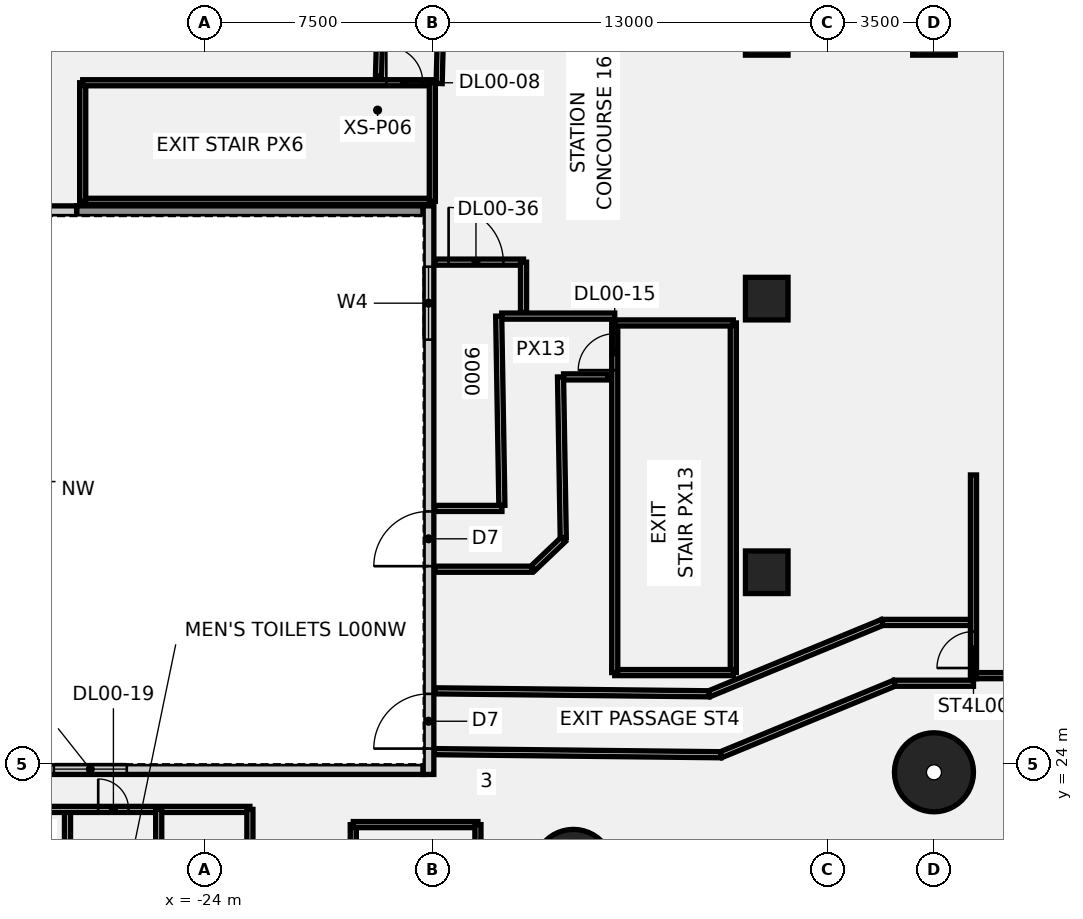
"""IFC4 building model, lengths in metres.
Left out: names, types, materials, properties, quantities, classifications, styles, units other than length and angle.
Written with IfcOpenShell. Run it as: python <this file> out.ifc"""

import sys

from ifc_helpers import new_model, si_unit, direction, frame, frame_2d, origin, origin_2d, place, context, subcontext, project, spatial, polyline, rectangle, circle, outline, extrude, element, fill, save


model = new_model("IFC4")
c1 = context("Model", 3, precision=1e-05, world=origin(), true_north=direction((0.0, 1.0)))
c2 = subcontext(c1, "Body", "Model", "MODEL_VIEW")
j1 = project(units=[si_unit("LENGTHUNIT", "METRE"), si_unit("PLANEANGLEUNIT", "RADIAN")], contexts=[c1])
p1 = place(None, origin())
s1 = spatial("IfcSite", under=j1, at=p1, CompositionType="ELEMENT")
p2 = place(p1, origin())
s2 = spatial("IfcBuilding", under=s1, at=p2, CompositionType="ELEMENT")
p3 = place(p2, origin())
s3 = spatial("IfcBuildingStorey", under=s2, at=p3, CompositionType="ELEMENT", Elevation=0.0)
for number, where, z_axis, x_axis in (
    (1, (0.0, 23.721, -0.55), (0.0, 0.0, 1.0), (1.0, 0.0, 0.0)),
    (2, (-11.86, 20.543, -0.55), (0.0, 0.0, 1.0), (1.0, 0.0, 0.0)),
):
    element("IfcColumn", number, at=place(p3, frame(where, z_axis=z_axis, x_axis=x_axis)), inside=s3, PredefinedType="COLUMN", context=c2, shape_type="SweptSolid", body=[
        extrude(circle(Radius=1.3, at=origin_2d()), origin(), (0.0, 0.0, 1.0), 9.05),
    ])
for number, where, z_axis, x_axis in (
    (3, (-5.5, 39.3, -0.55), (0.0, 0.0, 1.0), (1.0, 0.0, 0.0)),
    (4, (-5.5, 30.3, -0.55), (0.0, 0.0, 1.0), (1.0, 0.0, 0.0)),
    (5, (0.0, 48.008, -0.55), (0.0, 0.0, 1.0), (1.0, 0.0, 0.0)),
    (6, (-5.5, 48.008, -0.55), (0.0, 0.0, 1.0), (1.0, 0.0, 0.0)),
):
    element("IfcColumn", number, at=place(p3, frame(where, z_axis=z_axis, x_axis=x_axis)), inside=s3, PredefinedType="COLUMN", context=c2, shape_type="SweptSolid", body=[
        extrude(rectangle(XDim=1.4, YDim=1.4, at=origin_2d()), origin(), (0.0, 0.0, 1.0), 9.05),
    ])
p4 = place(p3, frame((-19.1, 10.3, 0.0), z_axis=(0.0, 0.0, 1.0), x_axis=(0.0, 1.0, 0.0)))
e7 = element("IfcWall", 7, at=p4, inside=s3, PredefinedType="PARTITIONING", context=c2, shape_type="SweptSolid", body=[
    extrude(rectangle(XDim=11.7, YDim=0.2, at=frame_2d((5.85, 0.0))), origin(), (0.0, 0.0, 1.0), 8.5),
])
p5 = place(p3, frame((-19.1, 22.0, 0.0), z_axis=(0.0, 0.0, 1.0), x_axis=(1.0, 0.0, 0.0)))
e8 = element("IfcWall", 8, at=p5, inside=s3, PredefinedType="PARTITIONING", context=c2, shape_type="SweptSolid", body=[
    extrude(rectangle(XDim=4.1, YDim=0.2, at=frame_2d((2.05, 0.0))), origin(), (0.0, 0.0, 1.0), 8.5),
])
p6 = place(p3, frame((-15.0, 10.3, 0.0), z_axis=(0.0, 0.0, 1.0), x_axis=(0.0, 1.0, 0.0)))
e9 = element("IfcWall", 9, at=p6, inside=s3, PredefinedType="PARTITIONING", context=c2, shape_type="SweptSolid", body=[
    extrude(rectangle(XDim=11.7, YDim=0.2, at=frame_2d((5.85, 0.0))), origin(), (0.0, 0.0, 1.0), 8.5),
])
p7 = place(p3, frame((-28.0, 42.5, 0.0), z_axis=(0.0, 0.0, 1.0), x_axis=(1.0, 0.0, 0.0)))
e10 = element("IfcWall", 10, at=p7, inside=s3, PredefinedType="PARTITIONING", context=c2, shape_type="SweptSolid", body=[
    extrude(rectangle(XDim=11.5, YDim=0.2, at=frame_2d((5.75, 0.0))), origin(), (0.0, 0.0, 1.0), 8.5),
])
p8 = place(p3, frame((-28.0, 42.5, 0.0), z_axis=(0.0, 0.0, 1.0), x_axis=(0.0, 1.0, 0.0)))
e11 = element("IfcWall", 11, at=p8, inside=s3, PredefinedType="PARTITIONING", context=c2, shape_type="SweptSolid", body=[
    extrude(rectangle(XDim=3.9, YDim=0.2, at=frame_2d((1.95, 0.0))), origin(), (0.0, 0.0, 1.0), 8.5),
])
p9 = place(p3, frame((-28.0, 46.4, 0.0), z_axis=(0.0, 0.0, 1.0), x_axis=(1.0, 0.0, 0.0)))
e12 = element("IfcWall", 12, at=p9, inside=s3, PredefinedType="PARTITIONING", context=c2, shape_type="SweptSolid", body=[
    extrude(rectangle(XDim=11.5, YDim=0.2, at=frame_2d((5.75, 0.0))), origin(), (0.0, 0.0, 1.0), 8.5),
])
p10 = place(p9, frame((9.987, 0.0, 0.0)))
e13 = element("IfcOpeningElement", 13, at=p10, cuts=e12, PredefinedType="OPENING", context=c2, shape_type="SweptSolid", body=[
    extrude(rectangle(XDim=1.2, YDim=2.1, at=frame_2d((0.6, 1.05))), frame((0.0, 0.11, 0.0), z_axis=(0.0, -1.0, 0.0), x_axis=(1.0, 0.0, 0.0)), (0.0, 0.0, 1.0), 0.22),
])
p11 = place(p3, frame((-16.5, 42.5, 0.0), z_axis=(0.0, 0.0, 1.0), x_axis=(0.0, 1.0, 0.0)))
e14 = element("IfcWall", 14, at=p11, inside=s3, PredefinedType="PARTITIONING", context=c2, shape_type="SweptSolid", body=[
    extrude(rectangle(XDim=3.9, YDim=0.2, at=frame_2d((1.95, 0.0))), origin(), (0.0, 0.0, 1.0), 8.5),
])
p12 = place(p3, frame((-6.6, 27.0, 0.0), z_axis=(0.0, 0.0, 1.0), x_axis=(0.0, 1.0, 0.0)))
e15 = element("IfcWall", 15, at=p12, inside=s3, PredefinedType="PARTITIONING", context=c2, shape_type="SweptSolid", body=[
    extrude(rectangle(XDim=11.5, YDim=0.2, at=frame_2d((5.75, 0.0))), origin(), (0.0, 0.0, 1.0), 8.5),
])
p13 = place(p3, frame((-10.5, 27.0, 0.0), z_axis=(0.0, 0.0, 1.0), x_axis=(1.0, 0.0, 0.0)))
e16 = element("IfcWall", 16, at=p13, inside=s3, PredefinedType="PARTITIONING", context=c2, shape_type="SweptSolid", body=[
    extrude(rectangle(XDim=3.9, YDim=0.2, at=frame_2d((1.95, 0.0))), origin(), (0.0, 0.0, 1.0), 8.5),
])
p14 = place(p3, frame((-10.5, 27.0, 0.0), z_axis=(0.0, 0.0, 1.0), x_axis=(0.0, 1.0, 0.0)))
e17 = element("IfcWall", 17, at=p14, inside=s3, PredefinedType="PARTITIONING", context=c2, shape_type="SweptSolid", body=[
    extrude(rectangle(XDim=11.5, YDim=0.2, at=frame_2d((5.75, 0.0))), origin(), (0.0, 0.0, 1.0), 8.5),
])
p15 = place(p14, frame((9.948, 0.0, 0.0)))
e18 = element("IfcOpeningElement", 18, at=p15, cuts=e17, PredefinedType="OPENING", context=c2, shape_type="SweptSolid", body=[
    extrude(rectangle(XDim=1.2, YDim=2.1, at=frame_2d((0.6, 1.05))), frame((0.0, 0.11, 0.0), z_axis=(0.0, -1.0, 0.0), x_axis=(1.0, 0.0, 0.0)), (0.0, 0.0, 1.0), 0.22),
])
p16 = place(p3, frame((-10.5, 38.5, 0.0), z_axis=(0.0, 0.0, 1.0), x_axis=(1.0, 0.0, 0.0)))
e19 = element("IfcWall", 19, at=p16, inside=s3, PredefinedType="PARTITIONING", context=c2, shape_type="SweptSolid", body=[
    extrude(rectangle(XDim=3.9, YDim=0.2, at=frame_2d((1.95, 0.0))), origin(), (0.0, 0.0, 1.0), 8.5),
])
p17 = place(p3, frame((-28.5, 13.5, 0.0), z_axis=(0.0, 0.0, 1.0), x_axis=(0.0, 1.0, 0.0)))
e20 = element("IfcWall", 20, at=p17, inside=s3, PredefinedType="PARTITIONING", context=c2, shape_type="SweptSolid", body=[
    extrude(rectangle(XDim=9.0, YDim=0.2, at=frame_2d((4.5, 0.0))), origin(), (0.0, 0.0, 1.0), 8.5),
])
p18 = place(p3, frame((-31.5, 22.5, 0.0), z_axis=(0.0, 0.0, 1.0), x_axis=(1.0, 0.0, 0.0)))
e21 = element("IfcWall", 21, at=p18, inside=s3, PredefinedType="PARTITIONING", context=c2, shape_type="SweptSolid", body=[
    extrude(rectangle(XDim=9.0, YDim=0.2, at=frame_2d((4.5, 0.0))), origin(), (0.0, 0.0, 1.0), 8.5),
])
p19 = place(p18, frame((4.01, 0.0, 0.0)))
e22 = element("IfcOpeningElement", 22, at=p19, cuts=e21, PredefinedType="OPENING", context=c2, shape_type="SweptSolid", body=[
    extrude(rectangle(XDim=1.0, YDim=2.1, at=frame_2d((0.5, 1.05))), frame((0.0, 0.11, 0.0), z_axis=(0.0, -1.0, 0.0), x_axis=(1.0, 0.0, 0.0)), (0.0, 0.0, 1.0), 0.22),
])
p20 = place(p3, frame((-22.5, 13.5, 0.0), z_axis=(0.0, 0.0, 1.0), x_axis=(0.0, 1.0, 0.0)))
e23 = element("IfcWall", 23, at=p20, inside=s3, PredefinedType="PARTITIONING", context=c2, shape_type="SweptSolid", body=[
    extrude(rectangle(XDim=9.0, YDim=0.2, at=frame_2d((4.5, 0.0))), origin(), (0.0, 0.0, 1.0), 8.5),
])
p21 = place(p20, frame((3.99, 0.0, 0.0)))
e24 = element("IfcOpeningElement", 24, at=p21, cuts=e23, PredefinedType="OPENING", context=c2, shape_type="SweptSolid", body=[
    extrude(rectangle(XDim=1.0, YDim=2.1, at=frame_2d((0.5, 1.05))), frame((0.0, 0.11, 0.0), z_axis=(0.0, -1.0, 0.0), x_axis=(1.0, 0.0, 0.0)), (0.0, 0.0, 1.0), 0.22),
])
p22 = place(p3, frame((-25.5, 13.5, 0.0), z_axis=(0.0, 0.0, 1.0), x_axis=(0.0, 1.0, 0.0)))
e25 = element("IfcWall", 25, at=p22, inside=s3, PredefinedType="PARTITIONING", context=c2, shape_type="SweptSolid", body=[
    extrude(rectangle(XDim=9.0, YDim=0.2, at=frame_2d((4.5, 0.0))), origin(), (0.0, 0.0, 1.0), 8.5),
])
p23 = place(p3, frame((-16.42, 40.5, 0.0), z_axis=(0.0, 0.0, 1.0), x_axis=(1.0, 0.0, 0.0)))
e26 = element("IfcWall", 26, at=p23, inside=s3, PredefinedType="PARTITIONING", context=c2, shape_type="SweptSolid", body=[
    extrude(rectangle(XDim=2.92, YDim=0.2, at=frame_2d((1.46, 0.0))), origin(), (0.0, 0.0, 1.0), 8.5),
])
p24 = place(p23, frame((0.455, 0.0, 0.0)))
e27 = element("IfcOpeningElement", 27, at=p24, cuts=e26, PredefinedType="OPENING", context=c2, shape_type="SweptSolid", body=[
    extrude(rectangle(XDim=1.8, YDim=2.1, at=frame_2d((0.9, 1.05))), frame((0.0, 0.11, 0.0), z_axis=(0.0, -1.0, 0.0), x_axis=(1.0, 0.0, 0.0)), (0.0, 0.0, 1.0), 0.22),
])
p25 = place(p3, frame((-13.5, 38.845, 0.0), z_axis=(0.0, 0.0, 1.0), x_axis=(0.0, 1.0, 0.0)))
e28 = element("IfcWall", 28, at=p25, inside=s3, PredefinedType="PARTITIONING", context=c2, shape_type="SweptSolid", body=[
    extrude(rectangle(XDim=1.655, YDim=0.2, at=frame_2d((0.828, 0.0))), origin(), (0.0, 0.0, 1.0), 8.5),
])
p26 = place(p3, frame((1.3, 26.65, 0.0), z_axis=(0.0, 0.0, 1.0), x_axis=(-1.0, 0.0, 0.0)))
e29 = element("IfcWall", 29, at=p26, inside=s3, PredefinedType="PARTITIONING", context=c2, shape_type="SweptSolid", body=[
    extrude(rectangle(XDim=2.602, YDim=0.2, at=frame_2d((1.301, 0.0))), origin(), (0.0, 0.0, 1.0), 8.5),
])
p27 = place(p3, frame((-1.302, 26.65, 0.0), z_axis=(0.0, 0.0, 1.0), x_axis=(-0.92451250122, -0.381151721874, 0.0)))
e30 = element("IfcWall", 30, at=p27, inside=s3, PredefinedType="PARTITIONING", context=c2, shape_type="SweptSolid", body=[
    extrude(rectangle(XDim=6.171, YDim=0.2, at=frame_2d((3.085, 0.0))), origin(), (0.0, 0.0, 1.0), 8.5),
])
p28 = place(p3, frame((-7.007, 24.298, 0.0), z_axis=(0.0, 0.0, 1.0), x_axis=(-0.999941090537, 0.010854282822, 0.0)))
e31 = element("IfcWall", 31, at=p28, inside=s3, PredefinedType="PARTITIONING", context=c2, shape_type="SweptSolid", body=[
    extrude(rectangle(XDim=9.424, YDim=0.2, at=frame_2d((4.712, 0.0))), origin(), (0.0, 0.0, 1.0), 8.5),
])
p29 = place(p3, frame((1.3, 28.65, 0.0), z_axis=(0.0, 0.0, 1.0), x_axis=(-1.0, 0.0, 0.0)))
e32 = element("IfcWall", 32, at=p29, inside=s3, PredefinedType="PARTITIONING", context=c2, shape_type="SweptSolid", body=[
    extrude(rectangle(XDim=2.998, YDim=0.2, at=frame_2d((1.499, 0.0))), origin(), (0.0, 0.0, 1.0), 8.5),
])
p30 = place(p3, frame((-1.698, 28.65, 0.0), z_axis=(0.0, 0.0, 1.0), x_axis=(-0.924522061362, -0.381128532198, 0.0)))
e33 = element("IfcWall", 33, at=p30, inside=s3, PredefinedType="PARTITIONING", context=c2, shape_type="SweptSolid", body=[
    extrude(rectangle(XDim=6.16, YDim=0.2, at=frame_2d((3.08, 0.0))), origin(), (0.0, 0.0, 1.0), 8.5),
])
p31 = place(p3, frame((-7.393, 26.302, 0.0), z_axis=(0.0, 0.0, 1.0), x_axis=(-0.99994134978, 0.010830373938, 0.0)))
e34 = element("IfcWall", 34, at=p31, inside=s3, PredefinedType="PARTITIONING", context=c2, shape_type="SweptSolid", body=[
    extrude(rectangle(XDim=9.017, YDim=0.2, at=frame_2d((4.508, 0.0))), origin(), (0.0, 0.0, 1.0), 8.5),
])
p32 = place(p3, frame((-18.27, 46.62, 0.0), z_axis=(0.0, 0.0, 1.0), x_axis=(0.025885861475, 0.999664904944, 0.0)))
e35 = element("IfcWall", 35, at=p32, inside=s3, PredefinedType="PARTITIONING", context=c2, shape_type="SweptSolid", body=[
    extrude(rectangle(XDim=3.631, YDim=0.2, at=frame_2d((1.815, 0.0))), origin(), (0.0, 0.0, 1.0), 8.5),
])
p33 = place(p3, frame((-16.275, 46.374, 0.0), z_axis=(0.0, 0.0, 1.0), x_axis=(0.025889289227, 0.999664816178, 0.0)))
e36 = element("IfcWall", 36, at=p33, inside=s3, PredefinedType="PARTITIONING", context=c2, shape_type="SweptSolid", body=[
    extrude(rectangle(XDim=1.877, YDim=0.2, at=frame_2d((0.938, 0.0))), origin(), (0.0, 0.0, 1.0), 8.5),
])
p34 = place(p3, frame((-10.72, 36.725, 0.0), z_axis=(0.0, 0.0, 1.0), x_axis=(-1.0, 0.0, 0.0)))
e37 = element("IfcWall", 37, at=p34, inside=s3, PredefinedType="PARTITIONING", context=c2, shape_type="SweptSolid", body=[
    extrude(rectangle(XDim=1.463, YDim=0.2, at=frame_2d((0.731, 0.0))), origin(), (0.0, 0.0, 1.0), 8.5),
])
p35 = place(p3, frame((-12.283, 36.725, 0.0), z_axis=(0.0, 0.0, 1.0), x_axis=(0.016867069191, -0.99985774087, 0.0)))
e38 = element("IfcWall", 38, at=p35, inside=s3, PredefinedType="PARTITIONING", context=c2, shape_type="SweptSolid", body=[
    extrude(rectangle(XDim=5.298, YDim=0.2, at=frame_2d((2.649, 0.0))), origin(), (0.0, 0.0, 1.0), 8.5),
])
p36 = place(p3, frame((-12.193, 31.378, 0.0), z_axis=(0.0, 0.0, 1.0), x_axis=(-0.724197315558, -0.689592813288, 0.0)))
e39 = element("IfcWall", 39, at=p36, inside=s3, PredefinedType="PARTITIONING", context=c2, shape_type="SweptSolid", body=[
    extrude(rectangle(XDim=1.369, YDim=0.2, at=frame_2d((0.684, 0.0))), origin(), (0.0, 0.0, 1.0), 8.5),
])
p37 = place(p3, frame((-13.22, 30.4, 0.0), z_axis=(0.0, 0.0, 1.0), x_axis=(-1.0, 0.0, 0.0)))
e40 = element("IfcWall", 40, at=p37, inside=s3, PredefinedType="PARTITIONING", context=c2, shape_type="SweptSolid", body=[
    extrude(rectangle(XDim=3.2, YDim=0.2, at=frame_2d((1.6, 0.0))), origin(), (0.0, 0.0, 1.0), 8.5),
])
p38 = place(p3, frame((-10.5, 38.725, 0.0), z_axis=(0.0, 0.0, 1.0), x_axis=(-1.0, 0.0, 0.0)))
e41 = element("IfcWall", 41, at=p38, inside=s3, PredefinedType="PARTITIONING", context=c2, shape_type="SweptSolid", body=[
    extrude(rectangle(XDim=3.717, YDim=0.2, at=frame_2d((1.858, 0.0))), origin(), (0.0, 0.0, 1.0), 8.5),
])
p39 = place(p3, frame((-14.317, 38.725, 0.0), z_axis=(0.0, 0.0, 1.0), x_axis=(0.016861670238, -0.999857831933, 0.0)))
e42 = element("IfcWall", 42, at=p39, inside=s3, PredefinedType="PARTITIONING", context=c2, shape_type="SweptSolid", body=[
    extrude(rectangle(XDim=6.226, YDim=0.2, at=frame_2d((3.113, 0.0))), origin(), (0.0, 0.0, 1.0), 8.5),
])
p40 = place(p3, frame((-14.21, 32.4, 0.0), z_axis=(0.0, 0.0, 1.0), x_axis=(-1.0, 0.0, 0.0)))
e43 = element("IfcWall", 43, at=p40, inside=s3, PredefinedType="PARTITIONING", context=c2, shape_type="SweptSolid", body=[
    extrude(rectangle(XDim=2.21, YDim=0.2, at=frame_2d((1.105, 0.0))), origin(), (0.0, 0.0, 1.0), 8.5),
])
p41 = place(p3, frame((-43.5, 23.825, 0.0), z_axis=(0.0, 0.0, 1.0), x_axis=(1.0, 0.0, 0.0)))
e44 = element("IfcWall", 44, at=p41, inside=s3, PredefinedType="SOLIDWALL", context=c2, shape_type="SweptSolid", body=[
    extrude(rectangle(XDim=26.7, YDim=0.35, at=frame_2d((13.35, 0.0))), origin(), (0.0, 0.0, 1.0), 8.5),
])
p42 = place(p41, frame((14.55, 0.0, 1.0)))
e45 = element("IfcOpeningElement", 45, at=p42, cuts=e44, PredefinedType="OPENING", context=c2, shape_type="SweptSolid", body=[
    extrude(rectangle(XDim=2.4, YDim=1.8, at=frame_2d((1.2, 0.9))), frame((0.0, 0.185, 0.0), z_axis=(0.0, -1.0, 0.0), x_axis=(1.0, 0.0, 0.0)), (0.0, 0.0, 1.0), 0.37),
])
p43 = place(p3, frame((-28.2, 42.175, 0.0), z_axis=(0.0, 0.0, 1.0), x_axis=(1.0, 0.0, 0.0)))
e46 = element("IfcWall", 46, at=p43, inside=s3, PredefinedType="SOLIDWALL", context=c2, shape_type="SweptSolid", body=[
    extrude(rectangle(XDim=11.4, YDim=0.35, at=frame_2d((5.7, 0.0))), origin(), (0.0, 0.0, 1.0), 8.5),
])
p44 = place(p3, frame((-33.2, 42.175, 4.9), z_axis=(0.0, 0.0, 1.0), x_axis=(1.0, 0.0, 0.0)))
e47 = element("IfcWall", 47, at=p44, inside=s3, PredefinedType="SOLIDWALL", context=c2, shape_type="SweptSolid", body=[
    extrude(rectangle(XDim=5.0, YDim=0.35, at=frame_2d((2.5, 0.0))), origin(), (0.0, 0.0, 1.0), 3.6),
])
p45 = place(p3, frame((-16.625, 23.65, 0.0), z_axis=(0.0, 0.0, 1.0), x_axis=(0.0, 1.0, 0.0)))
e48 = element("IfcWall", 48, at=p45, inside=s3, PredefinedType="SOLIDWALL", context=c2, shape_type="SweptSolid", body=[
    extrude(rectangle(XDim=18.7, YDim=0.35, at=frame_2d((9.35, 0.0))), origin(), (0.0, 0.0, 1.0), 8.5),
])
p46 = place(p45, frame((0.85, 0.0, 0.0)))
e49 = element("IfcOpeningElement", 49, at=p46, cuts=e48, PredefinedType="OPENING", context=c2, shape_type="SweptSolid", body=[
    extrude(rectangle(XDim=1.8, YDim=2.4, at=frame_2d((0.9, 1.2))), frame((0.0, 0.185, 0.0), z_axis=(0.0, -1.0, 0.0), x_axis=(1.0, 0.0, 0.0)), (0.0, 0.0, 1.0), 0.37),
])
p47 = place(p45, frame((6.85, 0.0, 0.0)))
e50 = element("IfcOpeningElement", 50, at=p47, cuts=e48, PredefinedType="OPENING", context=c2, shape_type="SweptSolid", body=[
    extrude(rectangle(XDim=1.8, YDim=2.4, at=frame_2d((0.9, 1.2))), frame((0.0, 0.185, 0.0), z_axis=(0.0, -1.0, 0.0), x_axis=(1.0, 0.0, 0.0)), (0.0, 0.0, 1.0), 0.37),
])
p48 = place(p45, frame((14.3, 0.0, 1.0)))
e51 = element("IfcOpeningElement", 51, at=p48, cuts=e48, PredefinedType="OPENING", context=c2, shape_type="SweptSolid", body=[
    extrude(rectangle(XDim=2.4, YDim=1.8, at=frame_2d((1.2, 0.9))), frame((0.0, 0.185, 0.0), z_axis=(0.0, -1.0, 0.0), x_axis=(1.0, 0.0, 0.0)), (0.0, 0.0, 1.0), 0.37),
])
p49 = place(p3, frame((1.3, 26.8, 0.0), z_axis=(0.0, 0.0, 1.0), x_axis=(0.0, 1.0, 0.0)))
e52 = element("IfcWall", 52, at=p49, inside=s3, PredefinedType="SHEAR", context=c2, shape_type="SweptSolid", body=[
    extrude(rectangle(XDim=6.7, YDim=0.2, at=frame_2d((3.35, 0.0))), origin(), (0.0, 0.0, 1.0), 8.5),
])
p50 = place(p49, frame((0.35, 0.0, 0.0)))
e53 = element("IfcOpeningElement", 53, at=p50, cuts=e52, PredefinedType="OPENING", context=c2, shape_type="SweptSolid", body=[
    extrude(rectangle(XDim=1.2, YDim=2.1, at=frame_2d((0.6, 1.05))), frame((0.0, 0.11, 0.0), z_axis=(0.0, -1.0, 0.0), x_axis=(1.0, 0.0, 0.0)), (0.0, 0.0, 1.0), 0.22),
])
p51 = place(p3, frame((4.6, 26.9, 0.0), z_axis=(0.0, 0.0, 1.0), x_axis=(-1.0, 0.0, 0.0)))
e54 = element("IfcWall", 54, at=p51, inside=s3, PredefinedType="SHEAR", context=c2, shape_type="SweptSolid", body=[
    extrude(rectangle(XDim=3.2, YDim=0.2, at=frame_2d((1.6, 0.0))), origin(), (0.0, 0.0, 1.0), 8.5),
])
p52 = place(p3, origin())
e55 = element("IfcWall", 55, at=p52, inside=s3, PredefinedType="SHEAR", context=c2, shape_type="SweptSolid", body=[
    extrude(outline(polyline([(4.6, 33.3), (4.6, 33.5), (1.4, 33.5), (1.4, 33.3), (4.6, 33.3)])), origin(), (0.0, 0.0, 1.0), 8.5),
])
p53 = place(p10, origin())
e56 = element("IfcDoor", 56, at=p53, inside=s3, OperationType="SINGLE_SWING_RIGHT", PredefinedType="DOOR", context=c2, shape_type="SweptSolid", body=[
    extrude(rectangle(XDim=1.2, YDim=2.1, at=frame_2d((0.6, 1.05))), frame((0.0, 0.025, 0.0), z_axis=(0.0, -1.0, 0.0), x_axis=(1.0, 0.0, 0.0)), (0.0, 0.0, 1.0), 0.05),
])
fill(e13, e56)
p54 = place(p15, origin())
e57 = element("IfcDoor", 57, at=p54, inside=s3, OperationType="SINGLE_SWING_LEFT", PredefinedType="DOOR", context=c2, shape_type="SweptSolid", body=[
    extrude(rectangle(XDim=1.2, YDim=2.1, at=frame_2d((0.6, 1.05))), frame((0.0, 0.025, 0.0), z_axis=(0.0, -1.0, 0.0), x_axis=(1.0, 0.0, 0.0)), (0.0, 0.0, 1.0), 0.05),
])
fill(e18, e57)
p55 = place(p19, origin())
e58 = element("IfcDoor", 58, at=p55, inside=s3, OperationType="SINGLE_SWING_LEFT", PredefinedType="DOOR", context=c2, shape_type="SweptSolid", body=[
    extrude(rectangle(XDim=1.0, YDim=2.1, at=frame_2d((0.5, 1.05))), frame((0.0, 0.025, 0.0), z_axis=(0.0, -1.0, 0.0), x_axis=(1.0, 0.0, 0.0)), (0.0, 0.0, 1.0), 0.05),
])
fill(e22, e58)
p56 = place(p24, origin())
e59 = element("IfcDoor", 59, at=p56, inside=s3, OperationType="SINGLE_SWING_RIGHT", PredefinedType="DOOR", context=c2, shape_type="SweptSolid", body=[
    extrude(rectangle(XDim=1.8, YDim=2.1, at=frame_2d((0.9, 1.05))), frame((0.0, 0.025, 0.0), z_axis=(0.0, -1.0, 0.0), x_axis=(1.0, 0.0, 0.0)), (0.0, 0.0, 1.0), 0.05),
])
fill(e27, e59)
p57 = place(p42, origin())
e60 = element("IfcWindow", 60, at=p57, inside=s3, PartitioningType="SINGLE_PANEL", PredefinedType="WINDOW", context=c2, shape_type="SweptSolid", body=[
    extrude(rectangle(XDim=2.4, YDim=1.8, at=frame_2d((1.2, 0.9))), frame((0.0, 0.03, 0.0), z_axis=(0.0, -1.0, 0.0), x_axis=(1.0, 0.0, 0.0)), (0.0, 0.0, 1.0), 0.06),
])
fill(e45, e60)
p58 = place(p46, origin())
e61 = element("IfcDoor", 61, at=p58, inside=s3, OperationType="SINGLE_SWING_LEFT", PredefinedType="DOOR", context=c2, shape_type="SweptSolid", body=[
    extrude(rectangle(XDim=1.8, YDim=2.4, at=frame_2d((0.9, 1.2))), frame((0.0, 0.025, 0.0), z_axis=(0.0, -1.0, 0.0), x_axis=(1.0, 0.0, 0.0)), (0.0, 0.0, 1.0), 0.05),
])
fill(e49, e61)
p59 = place(p47, origin())
e62 = element("IfcDoor", 62, at=p59, inside=s3, OperationType="SINGLE_SWING_LEFT", PredefinedType="DOOR", context=c2, shape_type="SweptSolid", body=[
    extrude(rectangle(XDim=1.8, YDim=2.4, at=frame_2d((0.9, 1.2))), frame((0.0, 0.025, 0.0), z_axis=(0.0, -1.0, 0.0), x_axis=(1.0, 0.0, 0.0)), (0.0, 0.0, 1.0), 0.05),
])
fill(e50, e62)
p60 = place(p48, origin())
e63 = element("IfcWindow", 63, at=p60, inside=s3, PartitioningType="SINGLE_PANEL", PredefinedType="WINDOW", context=c2, shape_type="SweptSolid", body=[
    extrude(rectangle(XDim=2.4, YDim=1.8, at=frame_2d((1.2, 0.9))), frame((0.0, 0.03, 0.0), z_axis=(0.0, -1.0, 0.0), x_axis=(1.0, 0.0, 0.0)), (0.0, 0.0, 1.0), 0.06),
])
fill(e51, e63)
p61 = place(p50, origin())
e64 = element("IfcDoor", 64, at=p61, inside=s3, OperationType="SINGLE_SWING_LEFT", PredefinedType="DOOR", context=c2, shape_type="SweptSolid", body=[
    extrude(rectangle(XDim=1.2, YDim=2.1, at=frame_2d((0.6, 1.05))), frame((0.0, 0.025, 0.0), z_axis=(0.0, -1.0, 0.0), x_axis=(1.0, 0.0, 0.0)), (0.0, 0.0, 1.0), 0.05),
])
fill(e53, e64)
save(model, sys.argv[1])
